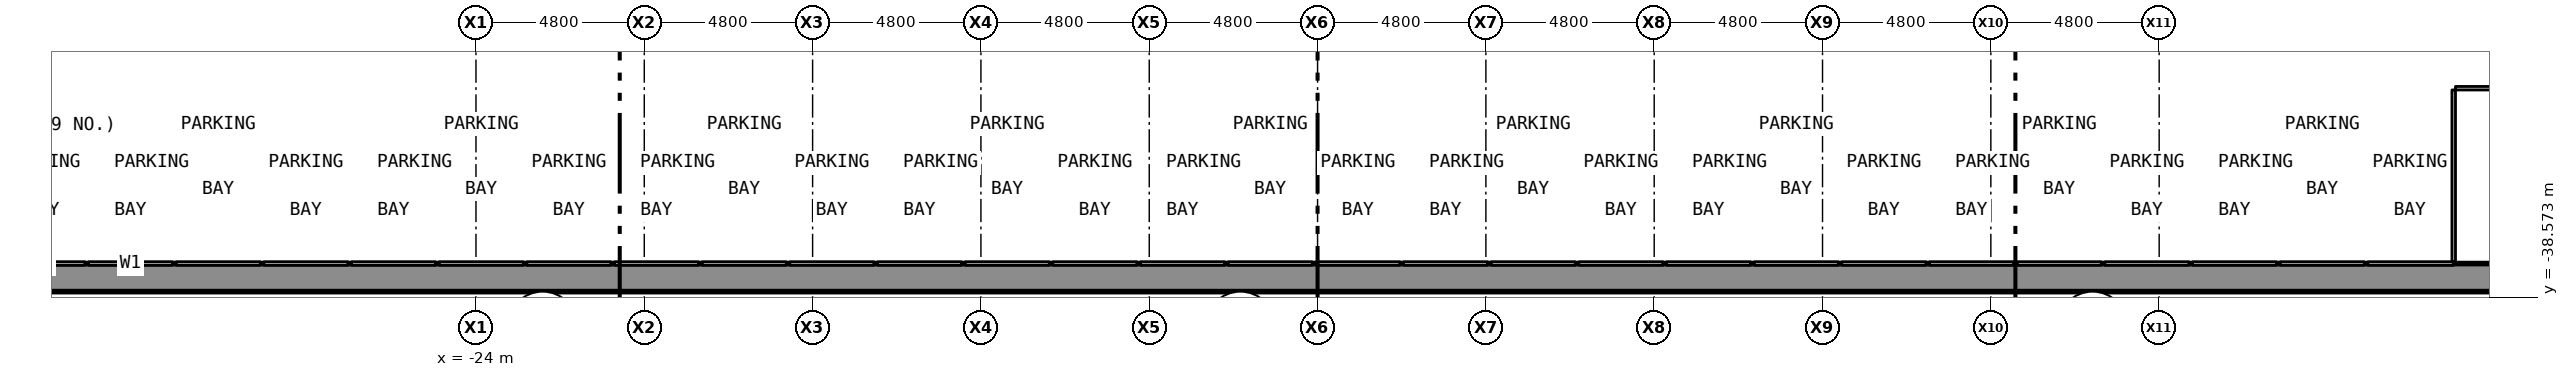
"""IFC4 building model, lengths in metres.
Left out: names, types, materials, properties, quantities, classifications, styles, units other than length and angle.
Written with IfcOpenShell. Run it as: python <this file> out.ifc"""

import sys

from ifc_helpers import new_model, si_unit, direction, frame, frame_2d, origin, place, context, subcontext, project, spatial, rectangle, extrude, element, save


model = new_model("IFC4")
c1 = context("Model", 3, precision=1e-05, world=origin(), true_north=direction((0.0, 1.0)))
c2 = subcontext(c1, "Body", "Model", "MODEL_VIEW")
j1 = project(units=[si_unit("LENGTHUNIT", "METRE"), si_unit("PLANEANGLEUNIT", "RADIAN")], contexts=[c1])
p1 = place(None, origin())
s1 = spatial("IfcSite", under=j1, at=p1, CompositionType="ELEMENT")
p2 = place(p1, origin())
s2 = spatial("IfcBuilding", under=s1, at=p2, CompositionType="ELEMENT")
p3 = place(p2, frame((0.0, 0.0, -10.0)))
s3 = spatial("IfcBuildingStorey", under=s2, at=p3, CompositionType="ELEMENT", Elevation=-10.0)
p4 = place(p3, frame((-37.6, -38.0, -0.6), z_axis=(0.0, 0.0, 1.0), x_axis=(1.0, 0.0, 0.0)))
e1 = element("IfcWall", 1, at=p4, inside=s3, PredefinedType="SOLIDWALL", context=c2, shape_type="SweptSolid", body=[
    extrude(rectangle(XDim=75.2, YDim=0.8, at=frame_2d((37.6, 0.0))), origin(), (0.0, 0.0, 1.0), 5.3),
])
p5 = place(p3, frame((-37.6, -37.6, 0.0), z_axis=(0.0, 0.0, 1.0), x_axis=(1.0, 0.0, 0.0)))
e2 = element("IfcWall", 2, at=p5, inside=s3, PredefinedType="PARTITIONING", context=c2, shape_type="SweptSolid", body=[
    extrude(rectangle(XDim=2.45, YDim=0.1, at=frame_2d((1.225, 0.0))), origin(), (0.0, 0.0, 1.0), 4.078),
])
for number, where, z_axis, x_axis in (
    (3, (-35.05, -37.6, 0.0), (0.0, 0.0, 1.0), (1.0, 0.0, 0.0)),
    (4, (-32.55, -37.6, 0.0), (0.0, 0.0, 1.0), (1.0, 0.0, 0.0)),
    (5, (-30.05, -37.6, 0.0), (0.0, 0.0, 1.0), (1.0, 0.0, 0.0)),
    (6, (-27.55, -37.6, 0.0), (0.0, 0.0, 1.0), (1.0, 0.0, 0.0)),
    (7, (-25.05, -37.6, 0.0), (0.0, 0.0, 1.0), (1.0, 0.0, 0.0)),
    (8, (-22.55, -37.6, 0.0), (0.0, 0.0, 1.0), (1.0, 0.0, 0.0)),
    (9, (-20.05, -37.6, 0.0), (0.0, 0.0, 1.0), (1.0, 0.0, 0.0)),
    (10, (-17.55, -37.6, 0.0), (0.0, 0.0, 1.0), (1.0, 0.0, 0.0)),
    (11, (-15.05, -37.6, 0.0), (0.0, 0.0, 1.0), (1.0, 0.0, 0.0)),
    (12, (-12.55, -37.6, 0.0), (0.0, 0.0, 1.0), (1.0, 0.0, 0.0)),
    (13, (-10.05, -37.6, 0.0), (0.0, 0.0, 1.0), (1.0, 0.0, 0.0)),
    (14, (-7.55, -37.6, 0.0), (0.0, 0.0, 1.0), (1.0, 0.0, 0.0)),
    (15, (-5.05, -37.6, 0.0), (0.0, 0.0, 1.0), (1.0, 0.0, 0.0)),
    (16, (-2.55, -37.6, 0.0), (0.0, 0.0, 1.0), (1.0, 0.0, 0.0)),
    (17, (-0.05, -37.6, 0.0), (0.0, 0.0, 1.0), (1.0, 0.0, 0.0)),
    (18, (2.45, -37.6, 0.0), (0.0, 0.0, 1.0), (1.0, 0.0, 0.0)),
    (19, (4.95, -37.6, 0.0), (0.0, 0.0, 1.0), (1.0, 0.0, 0.0)),
    (20, (7.45, -37.6, 0.0), (0.0, 0.0, 1.0), (1.0, 0.0, 0.0)),
    (21, (9.95, -37.6, 0.0), (0.0, 0.0, 1.0), (1.0, 0.0, 0.0)),
    (22, (12.45, -37.6, 0.0), (0.0, 0.0, 1.0), (1.0, 0.0, 0.0)),
    (23, (14.95, -37.6, 0.0), (0.0, 0.0, 1.0), (1.0, 0.0, 0.0)),
    (24, (17.45, -37.6, 0.0), (0.0, 0.0, 1.0), (1.0, 0.0, 0.0)),
    (25, (19.95, -37.6, 0.0), (0.0, 0.0, 1.0), (1.0, 0.0, 0.0)),
    (26, (22.45, -37.6, 0.0), (0.0, 0.0, 1.0), (1.0, 0.0, 0.0)),
    (27, (24.95, -37.6, 0.0), (0.0, 0.0, 1.0), (1.0, 0.0, 0.0)),
    (28, (27.45, -37.6, 0.0), (0.0, 0.0, 1.0), (1.0, 0.0, 0.0)),
):
    element("IfcWall", number, at=place(p3, frame(where, z_axis=z_axis, x_axis=x_axis)), inside=s3, PredefinedType="PARTITIONING", context=c2, shape_type="SweptSolid", body=[
        extrude(rectangle(XDim=2.4, YDim=0.1, at=frame_2d((1.2, 0.0))), origin(), (0.0, 0.0, 1.0), 4.078),
    ])
p6 = place(p3, frame((29.95, -37.6, 0.0), z_axis=(0.0, 0.0, 1.0), x_axis=(1.0, 0.0, 0.0)))
e29 = element("IfcWall", 29, at=p6, inside=s3, PredefinedType="PARTITIONING", context=c2, shape_type="SweptSolid", body=[
    extrude(rectangle(XDim=2.45, YDim=0.1, at=frame_2d((1.225, 0.0))), origin(), (0.0, 0.0, 1.0), 4.078),
])
p7 = place(p3, frame((32.45, -32.6, 0.0), z_axis=(0.0, 0.0, 1.0), x_axis=(1.0, 0.0, 0.0)))
e30 = element("IfcWall", 30, at=p7, inside=s3, PredefinedType="PARTITIONING", context=c2, shape_type="SweptSolid", body=[
    extrude(rectangle(XDim=5.15, YDim=0.1, at=frame_2d((2.575, 0.0))), origin(), (0.0, 0.0, 1.0), 4.7),
])
p8 = place(p3, frame((32.4, -37.55, 0.0), z_axis=(0.0, 0.0, 1.0), x_axis=(0.0, 1.0, 0.0)))
e31 = element("IfcWall", 31, at=p8, inside=s3, PredefinedType="PARTITIONING", context=c2, shape_type="SweptSolid", body=[
    extrude(rectangle(XDim=4.9, YDim=0.1, at=frame_2d((2.45, 0.0))), origin(), (0.0, 0.0, 1.0), 4.7),
])
save(model, sys.argv[1])
